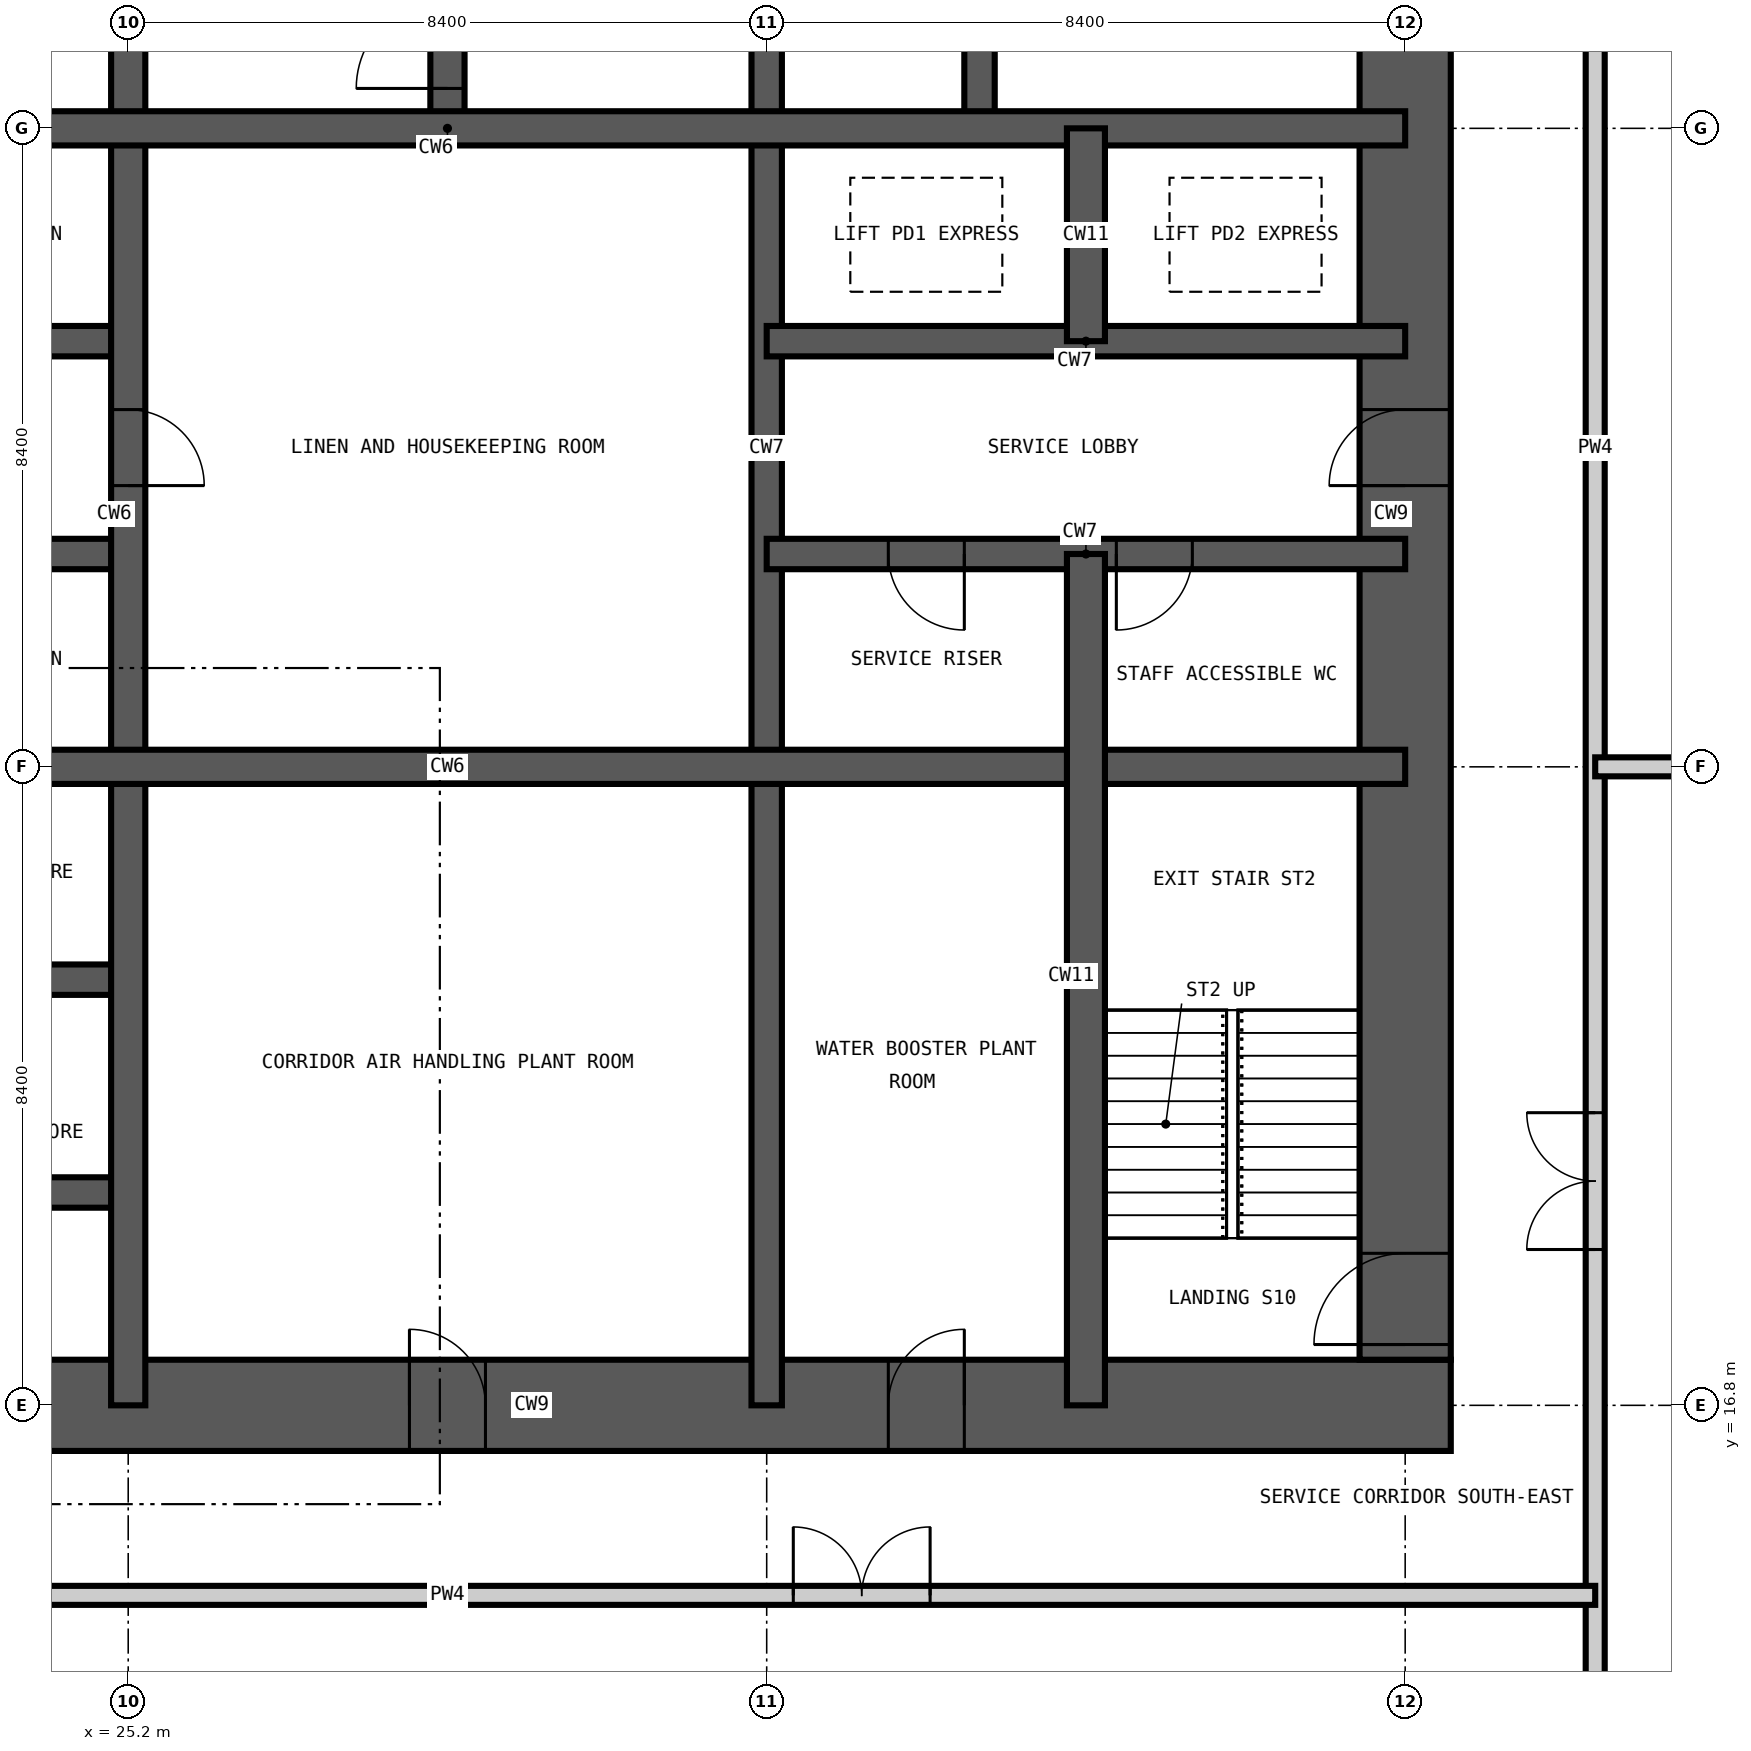
"""IFC4 building model, lengths in metres.
Left out: names, types, materials, properties, quantities, classifications, styles, units other than length and angle.
Written with IfcOpenShell. Run it as: python <this file> out.ifc"""

import sys

from ifc_helpers import new_model, si_unit, direction, frame, frame_2d, origin, place, context, subcontext, project, spatial, rectangle, extrude, element, fill, save


model = new_model("IFC4")
c1 = context("Model", 3, precision=1e-05, world=origin(), true_north=direction((0.0, 1.0)))
c2 = subcontext(c1, "Body", "Model", "MODEL_VIEW")
j1 = project(units=[si_unit("LENGTHUNIT", "METRE"), si_unit("PLANEANGLEUNIT", "RADIAN")], contexts=[c1])
p1 = place(None, origin())
s1 = spatial("IfcSite", under=j1, at=p1, CompositionType="ELEMENT")
p2 = place(p1, origin())
s2 = spatial("IfcBuilding", under=s1, at=p2, CompositionType="ELEMENT")
p3 = place(p2, frame((0.0, 0.0, 220.2)))
s3 = spatial("IfcBuildingStorey", under=s2, at=p3, CompositionType="ELEMENT", Elevation=220.2)
p4 = place(p3, frame((16.2, 16.8, -0.4), z_axis=(0.0, 0.0, 1.0), x_axis=(1.0, 0.0, 0.0)))
e1 = element("IfcWall", 1, at=p4, inside=s3, PredefinedType="SHEAR", context=c2, shape_type="SweptSolid", body=[
    extrude(rectangle(XDim=26.4, YDim=1.2, at=frame_2d((13.2, 0.0))), origin(), (0.0, 0.0, 1.0), 5.45),
])
p5 = place(p4, frame((12.7, 0.0, 0.4)))
e2 = element("IfcOpeningElement", 2, at=p5, cuts=e1, PredefinedType="OPENING", context=c2, shape_type="SweptSolid", body=[
    extrude(rectangle(XDim=1.0, YDim=2.1, at=frame_2d((0.5, 1.05))), frame((0.0, 0.61, 0.0), z_axis=(0.0, -1.0, 0.0), x_axis=(1.0, 0.0, 0.0)), (0.0, 0.0, 1.0), 1.22),
])
p6 = place(p4, frame((19.0, 0.0, 0.4)))
e3 = element("IfcOpeningElement", 3, at=p6, cuts=e1, PredefinedType="OPENING", context=c2, shape_type="SweptSolid", body=[
    extrude(rectangle(XDim=1.0, YDim=2.1, at=frame_2d((0.5, 1.05))), frame((0.0, 0.61, 0.0), z_axis=(0.0, -1.0, 0.0), x_axis=(1.0, 0.0, 0.0)), (0.0, 0.0, 1.0), 1.22),
])
p7 = place(p3, frame((42.0, 17.4, -0.4), z_axis=(0.0, 0.0, 1.0), x_axis=(0.0, 1.0, 0.0)))
e4 = element("IfcWall", 4, at=p7, inside=s3, PredefinedType="SHEAR", context=c2, shape_type="SweptSolid", body=[
    extrude(rectangle(XDim=24.0, YDim=1.2, at=frame_2d((12.0, 0.0))), origin(), (0.0, 0.0, 1.0), 5.45),
])
p8 = place(p7, frame((0.2, 0.0, 0.4)))
e5 = element("IfcOpeningElement", 5, at=p8, cuts=e4, PredefinedType="OPENING", context=c2, shape_type="SweptSolid", body=[
    extrude(rectangle(XDim=1.2, YDim=2.2, at=frame_2d((0.6, 1.1))), frame((0.0, 0.61, 0.0), z_axis=(0.0, -1.0, 0.0), x_axis=(1.0, 0.0, 0.0)), (0.0, 0.0, 1.0), 1.22),
])
p9 = place(p7, frame((11.5, 0.0, 0.4)))
e6 = element("IfcOpeningElement", 6, at=p9, cuts=e4, PredefinedType="OPENING", context=c2, shape_type="SweptSolid", body=[
    extrude(rectangle(XDim=1.0, YDim=2.1, at=frame_2d((0.5, 1.05))), frame((0.0, 0.61, 0.0), z_axis=(0.0, -1.0, 0.0), x_axis=(1.0, 0.0, 0.0)), (0.0, 0.0, 1.0), 1.22),
])
p10 = place(p7, frame((19.9, 0.0, 0.4)))
e7 = element("IfcOpeningElement", 7, at=p10, cuts=e4, PredefinedType="OPENING", context=c2, shape_type="SweptSolid", body=[
    extrude(rectangle(XDim=1.0, YDim=2.1, at=frame_2d((0.5, 1.05))), frame((0.0, 0.61, 0.0), z_axis=(0.0, -1.0, 0.0), x_axis=(1.0, 0.0, 0.0)), (0.0, 0.0, 1.0), 1.22),
])
p11 = place(p3, frame((33.6, 16.8, -0.4), z_axis=(0.0, 0.0, 1.0), x_axis=(0.0, 1.0, 0.0)))
e8 = element("IfcWall", 8, at=p11, inside=s3, PredefinedType="SHEAR", context=c2, shape_type="SweptSolid", body=[
    extrude(rectangle(XDim=25.2, YDim=0.4, at=frame_2d((12.6, 0.0))), origin(), (0.0, 0.0, 1.0), 5.45),
])
p12 = place(p11, frame((22.5, 0.0, 0.4)))
e9 = element("IfcOpeningElement", 9, at=p12, cuts=e8, PredefinedType="OPENING", context=c2, shape_type="SweptSolid", body=[
    extrude(rectangle(XDim=1.2, YDim=2.2, at=frame_2d((0.6, 1.1))), frame((0.0, 0.21, 0.0), z_axis=(0.0, -1.0, 0.0), x_axis=(1.0, 0.0, 0.0)), (0.0, 0.0, 1.0), 0.42),
])
p13 = place(p11, frame((18.3, 0.0, 0.4)))
e10 = element("IfcOpeningElement", 10, at=p13, cuts=e8, PredefinedType="OPENING", context=c2, shape_type="SweptSolid", body=[
    extrude(rectangle(XDim=1.2, YDim=2.2, at=frame_2d((0.6, 1.1))), frame((0.0, 0.21, 0.0), z_axis=(0.0, -1.0, 0.0), x_axis=(1.0, 0.0, 0.0)), (0.0, 0.0, 1.0), 0.42),
])
p14 = place(p3, frame((36.4, 33.6, -0.4), z_axis=(0.0, 0.0, 1.0), x_axis=(0.0, 1.0, 0.0)))
e11 = element("IfcWall", 11, at=p14, inside=s3, PredefinedType="SHEAR", context=c2, shape_type="SweptSolid", body=[
    extrude(rectangle(XDim=8.4, YDim=0.4, at=frame_2d((4.2, 0.0))), origin(), (0.0, 0.0, 1.0), 5.45),
])
p15 = place(p3, frame((16.8, 19.6, -0.4), z_axis=(0.0, 0.0, 1.0), x_axis=(1.0, 0.0, 0.0)))
e12 = element("IfcWall", 12, at=p15, inside=s3, PredefinedType="SHEAR", context=c2, shape_type="SweptSolid", body=[
    extrude(rectangle(XDim=8.4, YDim=0.4, at=frame_2d((4.2, 0.0))), origin(), (0.0, 0.0, 1.0), 5.45),
])
p16 = place(p15, frame((1.6, 0.0, 0.4)))
e13 = element("IfcOpeningElement", 13, at=p16, cuts=e12, PredefinedType="OPENING", context=c2, shape_type="SweptSolid", body=[
    extrude(rectangle(XDim=1.0, YDim=2.1, at=frame_2d((0.5, 1.05))), frame((0.0, 0.21, 0.0), z_axis=(0.0, -1.0, 0.0), x_axis=(1.0, 0.0, 0.0)), (0.0, 0.0, 1.0), 0.42),
])
p17 = place(p15, frame((5.8, 0.0, 0.4)))
e14 = element("IfcOpeningElement", 14, at=p17, cuts=e12, PredefinedType="OPENING", context=c2, shape_type="SweptSolid", body=[
    extrude(rectangle(XDim=1.0, YDim=2.1, at=frame_2d((0.5, 1.05))), frame((0.0, 0.21, 0.0), z_axis=(0.0, -1.0, 0.0), x_axis=(1.0, 0.0, 0.0)), (0.0, 0.0, 1.0), 0.42),
])
p18 = place(p3, frame((16.8, 22.4, -0.4), z_axis=(0.0, 0.0, 1.0), x_axis=(1.0, 0.0, 0.0)))
e15 = element("IfcWall", 15, at=p18, inside=s3, PredefinedType="SHEAR", context=c2, shape_type="SweptSolid", body=[
    extrude(rectangle(XDim=8.4, YDim=0.4, at=frame_2d((4.2, 0.0))), origin(), (0.0, 0.0, 1.0), 5.45),
])
p19 = place(p18, frame((1.6, 0.0, 0.4)))
e16 = element("IfcOpeningElement", 16, at=p19, cuts=e15, PredefinedType="OPENING", context=c2, shape_type="SweptSolid", body=[
    extrude(rectangle(XDim=1.0, YDim=2.1, at=frame_2d((0.5, 1.05))), frame((0.0, 0.21, 0.0), z_axis=(0.0, -1.0, 0.0), x_axis=(1.0, 0.0, 0.0)), (0.0, 0.0, 1.0), 0.42),
])
p20 = place(p18, frame((5.8, 0.0, 0.4)))
e17 = element("IfcOpeningElement", 17, at=p20, cuts=e15, PredefinedType="OPENING", context=c2, shape_type="SweptSolid", body=[
    extrude(rectangle(XDim=1.0, YDim=2.1, at=frame_2d((0.5, 1.05))), frame((0.0, 0.21, 0.0), z_axis=(0.0, -1.0, 0.0), x_axis=(1.0, 0.0, 0.0)), (0.0, 0.0, 1.0), 0.42),
])
p21 = place(p3, frame((16.8, 28.0, -0.4), z_axis=(0.0, 0.0, 1.0), x_axis=(1.0, 0.0, 0.0)))
e18 = element("IfcWall", 18, at=p21, inside=s3, PredefinedType="SHEAR", context=c2, shape_type="SweptSolid", body=[
    extrude(rectangle(XDim=8.4, YDim=0.4, at=frame_2d((4.2, 0.0))), origin(), (0.0, 0.0, 1.0), 5.45),
])
p22 = place(p3, frame((33.6, 28.0, -0.4), z_axis=(0.0, 0.0, 1.0), x_axis=(1.0, 0.0, 0.0)))
e19 = element("IfcWall", 19, at=p22, inside=s3, PredefinedType="SHEAR", context=c2, shape_type="SweptSolid", body=[
    extrude(rectangle(XDim=8.4, YDim=0.4, at=frame_2d((4.2, 0.0))), origin(), (0.0, 0.0, 1.0), 5.45),
])
p23 = place(p22, frame((1.6, 0.0, 0.4)))
e20 = element("IfcOpeningElement", 20, at=p23, cuts=e19, PredefinedType="OPENING", context=c2, shape_type="SweptSolid", body=[
    extrude(rectangle(XDim=1.0, YDim=2.1, at=frame_2d((0.5, 1.05))), frame((0.0, 0.21, 0.0), z_axis=(0.0, -1.0, 0.0), x_axis=(1.0, 0.0, 0.0)), (0.0, 0.0, 1.0), 0.42),
])
p24 = place(p22, frame((4.6, 0.0, 0.4)))
e21 = element("IfcOpeningElement", 21, at=p24, cuts=e19, PredefinedType="OPENING", context=c2, shape_type="SweptSolid", body=[
    extrude(rectangle(XDim=1.0, YDim=2.1, at=frame_2d((0.5, 1.05))), frame((0.0, 0.21, 0.0), z_axis=(0.0, -1.0, 0.0), x_axis=(1.0, 0.0, 0.0)), (0.0, 0.0, 1.0), 0.42),
])
for number, where, z_axis, x_axis in (
    (22, (16.8, 30.8, -0.4), (0.0, 0.0, 1.0), (1.0, 0.0, 0.0)),
    (23, (33.6, 30.8, -0.4), (0.0, 0.0, 1.0), (1.0, 0.0, 0.0)),
):
    element("IfcWall", number, at=place(p3, frame(where, z_axis=z_axis, x_axis=x_axis)), inside=s3, PredefinedType="SHEAR", context=c2, shape_type="SweptSolid", body=[
        extrude(rectangle(XDim=8.4, YDim=0.4, at=frame_2d((4.2, 0.0))), origin(), (0.0, 0.0, 1.0), 5.45),
    ])
p25 = place(p3, frame((25.2, 16.8, -0.4), z_axis=(0.0, 0.0, 1.0), x_axis=(0.0, 1.0, 0.0)))
e24 = element("IfcWall", 24, at=p25, inside=s3, PredefinedType="SHEAR", context=c2, shape_type="SweptSolid", body=[
    extrude(rectangle(XDim=25.2, YDim=0.45, at=frame_2d((12.6, 0.0))), origin(), (0.0, 0.0, 1.0), 5.45),
])
p26 = place(p25, frame((12.1, 0.0, 0.4)))
e25 = element("IfcOpeningElement", 25, at=p26, cuts=e24, PredefinedType="OPENING", context=c2, shape_type="SweptSolid", body=[
    extrude(rectangle(XDim=1.0, YDim=2.1, at=frame_2d((0.5, 1.05))), frame((0.0, 0.235, 0.0), z_axis=(0.0, -1.0, 0.0), x_axis=(1.0, 0.0, 0.0)), (0.0, 0.0, 1.0), 0.47),
])
p27 = place(p3, frame((29.4, 33.6, -0.4), z_axis=(0.0, 0.0, 1.0), x_axis=(0.0, 1.0, 0.0)))
e26 = element("IfcWall", 26, at=p27, inside=s3, PredefinedType="SHEAR", context=c2, shape_type="SweptSolid", body=[
    extrude(rectangle(XDim=8.4, YDim=0.45, at=frame_2d((4.2, 0.0))), origin(), (0.0, 0.0, 1.0), 5.45),
])
p28 = place(p27, frame((0.525, 0.0, 0.4)))
e27 = element("IfcOpeningElement", 27, at=p28, cuts=e26, PredefinedType="OPENING", context=c2, shape_type="SweptSolid", body=[
    extrude(rectangle(XDim=1.2, YDim=2.2, at=frame_2d((0.6, 1.1))), frame((0.0, 0.235, 0.0), z_axis=(0.0, -1.0, 0.0), x_axis=(1.0, 0.0, 0.0)), (0.0, 0.0, 1.0), 0.47),
])
for number, where, z_axis, x_axis in (
    (28, (16.8, 25.2, -0.4), (0.0, 0.0, 1.0), (1.0, 0.0, 0.0)),
    (29, (16.8, 33.6, -0.4), (0.0, 0.0, 1.0), (1.0, 0.0, 0.0)),
):
    element("IfcWall", number, at=place(p3, frame(where, z_axis=z_axis, x_axis=x_axis)), inside=s3, PredefinedType="SHEAR", context=c2, shape_type="SweptSolid", body=[
        extrude(rectangle(XDim=25.2, YDim=0.45, at=frame_2d((12.6, 0.0))), origin(), (0.0, 0.0, 1.0), 5.45),
    ])
p29 = place(p3, frame((37.8, 16.8, -0.4), z_axis=(0.0, 0.0, 1.0), x_axis=(0.0, 1.0, 0.0)))
e30 = element("IfcWall", 30, at=p29, inside=s3, PredefinedType="SHEAR", context=c2, shape_type="SweptSolid", body=[
    extrude(rectangle(XDim=11.2, YDim=0.5, at=frame_2d((5.6, 0.0))), origin(), (0.0, 0.0, 1.0), 5.45),
])
p30 = place(p3, frame((37.8, 30.8, -0.4), z_axis=(0.0, 0.0, 1.0), x_axis=(0.0, 1.0, 0.0)))
e31 = element("IfcWall", 31, at=p30, inside=s3, PredefinedType="SHEAR", context=c2, shape_type="SweptSolid", body=[
    extrude(rectangle(XDim=2.8, YDim=0.5, at=frame_2d((1.4, 0.0))), origin(), (0.0, 0.0, 1.0), 5.45),
])
p31 = place(p3, frame((44.5, 4.182, 0.0), z_axis=(0.0, 0.0, 1.0), x_axis=(0.0, 1.0, 0.0)))
e32 = element("IfcWall", 32, at=p31, inside=s3, PredefinedType="PARTITIONING", context=c2, shape_type="SweptSolid", body=[
    extrude(rectangle(XDim=50.436, YDim=0.25, at=frame_2d((25.218, 0.0))), origin(), (0.0, 0.0, 1.0), 5.05),
])
p32 = place(p31, frame((14.668, 0.0, 0.0)))
e33 = element("IfcOpeningElement", 33, at=p32, cuts=e32, PredefinedType="OPENING", context=c2, shape_type="SweptSolid", body=[
    extrude(rectangle(XDim=1.8, YDim=2.4, at=frame_2d((0.9, 1.2))), frame((0.0, 0.135, 0.0), z_axis=(0.0, -1.0, 0.0), x_axis=(1.0, 0.0, 0.0)), (0.0, 0.0, 1.0), 0.27),
])
p33 = place(p31, frame((33.968, 0.0, 0.0)))
e34 = element("IfcOpeningElement", 34, at=p33, cuts=e32, PredefinedType="OPENING", context=c2, shape_type="SweptSolid", body=[
    extrude(rectangle(XDim=1.8, YDim=2.4, at=frame_2d((0.9, 1.2))), frame((0.0, 0.135, 0.0), z_axis=(0.0, -1.0, 0.0), x_axis=(1.0, 0.0, 0.0)), (0.0, 0.0, 1.0), 0.27),
])
p34 = place(p3, frame((14.3, 14.3, 0.0), z_axis=(0.0, 0.0, 1.0), x_axis=(1.0, 0.0, 0.0)))
e35 = element("IfcWall", 35, at=p34, inside=s3, PredefinedType="PARTITIONING", context=c2, shape_type="SweptSolid", body=[
    extrude(rectangle(XDim=30.2, YDim=0.25, at=frame_2d((15.1, 0.0))), origin(), (0.0, 0.0, 1.0), 5.05),
])
p35 = place(p34, frame((19.65, 0.0, 0.0)))
e36 = element("IfcOpeningElement", 36, at=p35, cuts=e35, PredefinedType="OPENING", context=c2, shape_type="SweptSolid", body=[
    extrude(rectangle(XDim=1.8, YDim=2.4, at=frame_2d((0.9, 1.2))), frame((0.0, 0.135, 0.0), z_axis=(0.0, -1.0, 0.0), x_axis=(1.0, 0.0, 0.0)), (0.0, 0.0, 1.0), 0.27),
])
p36 = place(p34, frame((4.55, 0.0, 0.0)))
e37 = element("IfcOpeningElement", 37, at=p36, cuts=e35, PredefinedType="OPENING", context=c2, shape_type="SweptSolid", body=[
    extrude(rectangle(XDim=1.8, YDim=2.4, at=frame_2d((0.9, 1.2))), frame((0.0, 0.135, 0.0), z_axis=(0.0, -1.0, 0.0), x_axis=(1.0, 0.0, 0.0)), (0.0, 0.0, 1.0), 0.27),
])
p37 = place(p3, frame((44.5, 25.2, 0.0), z_axis=(0.0, 0.0, 1.0), x_axis=(1.0, 0.0, 0.0)))
e38 = element("IfcWall", 38, at=p37, inside=s3, PredefinedType="PARTITIONING", context=c2, shape_type="SweptSolid", body=[
    extrude(rectangle(XDim=10.118, YDim=0.25, at=frame_2d((5.059, 0.0))), origin(), (0.0, 0.0, 1.0), 5.05),
])
p38 = place(p28, origin())
e39 = element("IfcDoor", 39, at=p38, inside=s3, OperationType="SINGLE_SWING_LEFT", PredefinedType="DOOR", context=c2, shape_type="SweptSolid", body=[
    extrude(rectangle(XDim=1.2, YDim=2.2, at=frame_2d((0.6, 1.1))), frame((0.0, 0.025, 0.0), z_axis=(0.0, -1.0, 0.0), x_axis=(1.0, 0.0, 0.0)), (0.0, 0.0, 1.0), 0.05),
])
fill(e27, e39)
p39 = place(p8, origin())
e40 = element("IfcDoor", 40, at=p39, inside=s3, OperationType="SINGLE_SWING_LEFT", PredefinedType="DOOR", context=c2, shape_type="SweptSolid", body=[
    extrude(rectangle(XDim=1.2, YDim=2.2, at=frame_2d((0.6, 1.1))), frame((0.0, 0.025, 0.0), z_axis=(0.0, -1.0, 0.0), x_axis=(1.0, 0.0, 0.0)), (0.0, 0.0, 1.0), 0.05),
])
fill(e5, e40)
p40 = place(p35, origin())
e41 = element("IfcDoor", 41, at=p40, inside=s3, OperationType="DOUBLE_DOOR_DOUBLE_SWING", PredefinedType="DOOR", context=c2, shape_type="SweptSolid", body=[
    extrude(rectangle(XDim=1.8, YDim=2.4, at=frame_2d((0.9, 1.2))), frame((0.0, 0.025, 0.0), z_axis=(0.0, -1.0, 0.0), x_axis=(1.0, 0.0, 0.0)), (0.0, 0.0, 1.0), 0.05),
])
fill(e36, e41)
p41 = place(p32, origin())
e42 = element("IfcDoor", 42, at=p41, inside=s3, OperationType="DOUBLE_DOOR_DOUBLE_SWING", PredefinedType="DOOR", context=c2, shape_type="SweptSolid", body=[
    extrude(rectangle(XDim=1.8, YDim=2.4, at=frame_2d((0.9, 1.2))), frame((0.0, 0.025, 0.0), z_axis=(0.0, -1.0, 0.0), x_axis=(1.0, 0.0, 0.0)), (0.0, 0.0, 1.0), 0.05),
])
fill(e33, e42)
p42 = place(p26, frame((1.0, 0.0, 0.0), z_axis=(0.0, 0.0, 1.0), x_axis=(-1.0, 0.0, 0.0)))
e43 = element("IfcDoor", 43, at=p42, inside=s3, OperationType="SINGLE_SWING_RIGHT", PredefinedType="DOOR", context=c2, shape_type="SweptSolid", body=[
    extrude(rectangle(XDim=1.0, YDim=2.1, at=frame_2d((0.5, 1.05))), frame((0.0, 0.025, 0.0), z_axis=(0.0, -1.0, 0.0), x_axis=(1.0, 0.0, 0.0)), (0.0, 0.0, 1.0), 0.05),
])
fill(e25, e43)
p43 = place(p23, frame((1.0, 0.0, 0.0), z_axis=(0.0, 0.0, 1.0), x_axis=(-1.0, 0.0, 0.0)))
e44 = element("IfcDoor", 44, at=p43, inside=s3, OperationType="SINGLE_SWING_LEFT", PredefinedType="DOOR", context=c2, shape_type="SweptSolid", body=[
    extrude(rectangle(XDim=1.0, YDim=2.1, at=frame_2d((0.5, 1.05))), frame((0.0, 0.025, 0.0), z_axis=(0.0, -1.0, 0.0), x_axis=(1.0, 0.0, 0.0)), (0.0, 0.0, 1.0), 0.05),
])
fill(e20, e44)
p44 = place(p24, frame((1.0, 0.0, 0.0), z_axis=(0.0, 0.0, 1.0), x_axis=(-1.0, 0.0, 0.0)))
e45 = element("IfcDoor", 45, at=p44, inside=s3, OperationType="SINGLE_SWING_RIGHT", PredefinedType="DOOR", context=c2, shape_type="SweptSolid", body=[
    extrude(rectangle(XDim=1.0, YDim=2.1, at=frame_2d((0.5, 1.05))), frame((0.0, 0.025, 0.0), z_axis=(0.0, -1.0, 0.0), x_axis=(1.0, 0.0, 0.0)), (0.0, 0.0, 1.0), 0.05),
])
fill(e21, e45)
p45 = place(p9, origin())
e46 = element("IfcDoor", 46, at=p45, inside=s3, OperationType="SINGLE_SWING_LEFT", PredefinedType="DOOR", context=c2, shape_type="SweptSolid", body=[
    extrude(rectangle(XDim=1.0, YDim=2.1, at=frame_2d((0.5, 1.05))), frame((0.0, 0.025, 0.0), z_axis=(0.0, -1.0, 0.0), x_axis=(1.0, 0.0, 0.0)), (0.0, 0.0, 1.0), 0.05),
])
fill(e6, e46)
p46 = place(p5, origin())
e47 = element("IfcDoor", 47, at=p46, inside=s3, OperationType="SINGLE_SWING_LEFT", PredefinedType="DOOR", context=c2, shape_type="SweptSolid", body=[
    extrude(rectangle(XDim=1.0, YDim=2.1, at=frame_2d((0.5, 1.05))), frame((0.0, 0.025, 0.0), z_axis=(0.0, -1.0, 0.0), x_axis=(1.0, 0.0, 0.0)), (0.0, 0.0, 1.0), 0.05),
])
fill(e2, e47)
p47 = place(p6, origin())
e48 = element("IfcDoor", 48, at=p47, inside=s3, OperationType="SINGLE_SWING_RIGHT", PredefinedType="DOOR", context=c2, shape_type="SweptSolid", body=[
    extrude(rectangle(XDim=1.0, YDim=2.1, at=frame_2d((0.5, 1.05))), frame((0.0, 0.025, 0.0), z_axis=(0.0, -1.0, 0.0), x_axis=(1.0, 0.0, 0.0)), (0.0, 0.0, 1.0), 0.05),
])
fill(e3, e48)
save(model, sys.argv[1])
